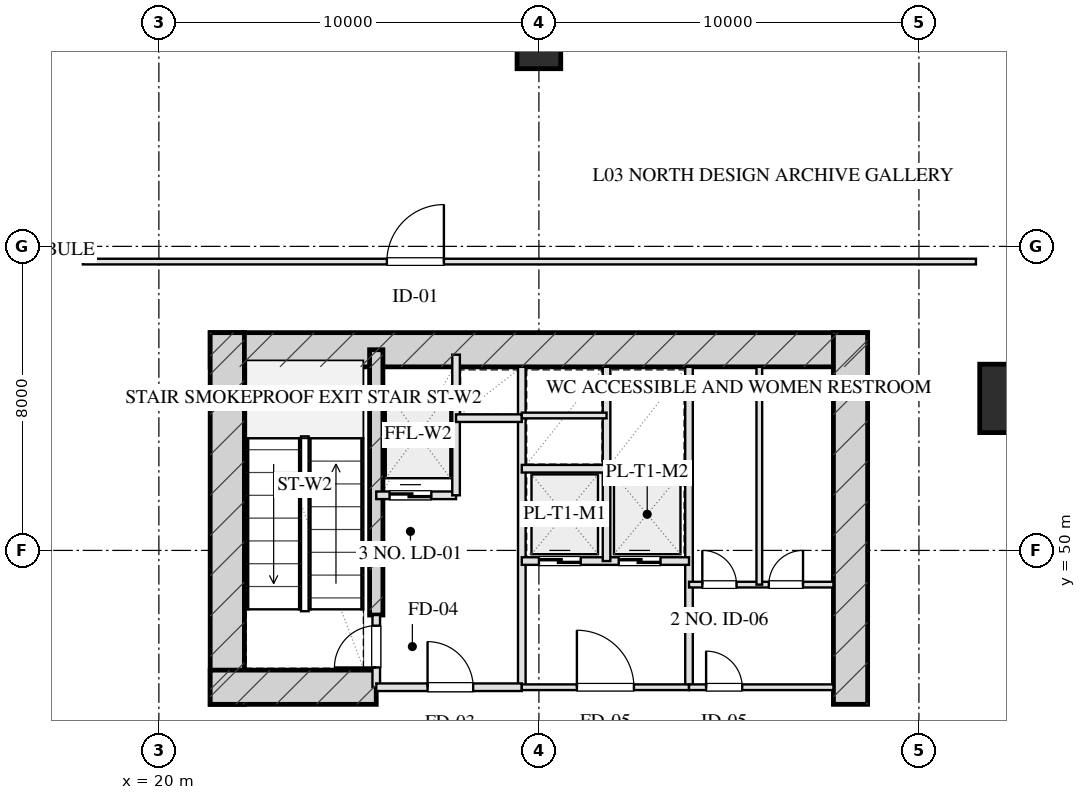
"""IFC4 building model, lengths in metres.
Left out: names, types, materials, properties, quantities, classifications, styles, units other than length and angle.
Written with IfcOpenShell. Run it as: python <this file> out.ifc"""

import sys

from ifc_helpers import new_model, si_unit, direction, frame, frame_2d, origin, origin_2d, place, context, subcontext, project, spatial, rectangle, hollow_rectangle, extrude, element, fill, save


model = new_model("IFC4")
c1 = context("Model", 3, precision=1e-05, world=origin(), true_north=direction((0.0, 1.0)))
c2 = subcontext(c1, "Body", "Model", "MODEL_VIEW")
j1 = project(units=[si_unit("LENGTHUNIT", "METRE"), si_unit("PLANEANGLEUNIT", "RADIAN")], contexts=[c1])
p1 = place(None, origin())
s1 = spatial("IfcSite", under=j1, at=p1, CompositionType="ELEMENT")
p2 = place(p1, origin())
s2 = spatial("IfcBuilding", under=s1, at=p2, CompositionType="ELEMENT")
p3 = place(p2, frame((0.0, 0.0, 16.5)))
s3 = spatial("IfcBuildingStorey", under=s2, at=p3, CompositionType="ELEMENT", Elevation=16.5)
p4 = place(p3, frame((21.35, 55.28, 0.0), z_axis=(0.0, 0.0, 1.0), x_axis=(1.0, 0.0, 0.0)))
e1 = element("IfcWall", 1, at=p4, inside=s3, PredefinedType="SHEAR", context=c2, shape_type="SweptSolid", body=[
    extrude(rectangle(XDim=17.3, YDim=0.9, at=frame_2d((8.65, 0.0))), origin(), (0.0, 0.0, 1.0), 5.5),
])
for number, where, z_axis, x_axis in (
    (2, (21.8, 45.95, 0.0), (0.0, 0.0, 1.0), (0.0, 1.0, 0.0)),
    (3, (38.2, 45.95, 0.0), (0.0, 0.0, 1.0), (0.0, 1.0, 0.0)),
):
    element("IfcWall", number, at=place(p3, frame(where, z_axis=z_axis, x_axis=x_axis)), inside=s3, PredefinedType="SHEAR", context=c2, shape_type="SweptSolid", body=[
        extrude(rectangle(XDim=9.78, YDim=0.9, at=frame_2d((4.89, 0.0))), origin(), (0.0, 0.0, 1.0), 5.5),
    ])
p5 = place(p3, frame((25.72, 48.3, 0.0), z_axis=(0.0, 0.0, 1.0), x_axis=(0.0, 1.0, 0.0)))
e4 = element("IfcWall", 4, at=p5, inside=s3, PredefinedType="SHEAR", context=c2, shape_type="SweptSolid", body=[
    extrude(rectangle(XDim=6.98, YDim=0.35, at=frame_2d((3.49, 0.0))), origin(), (0.0, 0.0, 1.0), 5.5),
])
p6 = place(p3, frame((21.35, 46.4, 0.0), z_axis=(0.0, 0.0, 1.0), x_axis=(1.0, 0.0, 0.0)))
e5 = element("IfcWall", 5, at=p6, inside=s3, PredefinedType="SHEAR", context=c2, shape_type="SweptSolid", body=[
    extrude(rectangle(XDim=4.37, YDim=0.9, at=frame_2d((2.185, 0.0))), origin(), (0.0, 0.0, 1.0), 5.5),
])
p7 = place(p3, frame((42.5, 54.0, 0.0), z_axis=(0.0, 0.0, 1.0), x_axis=(1.0, 0.0, 0.0)))
e6 = element("IfcColumn", 6, at=p7, inside=s3, PredefinedType="COLUMN", context=c2, shape_type="SweptSolid", body=[
    extrude(hollow_rectangle(XDim=1.8, YDim=1.8, WallThickness=0.06, at=origin_2d()), origin(), (0.0, 0.0, 1.0), 5.501),
])
p8 = place(p3, frame((30.0, 63.25, 0.0), z_axis=(0.0, 0.0, 1.0), x_axis=(1.0, 0.0, 0.0)))
e7 = element("IfcColumn", 7, at=p8, inside=s3, PredefinedType="COLUMN", context=c2, shape_type="SweptSolid", body=[
    extrude(hollow_rectangle(XDim=1.15, YDim=1.15, WallThickness=0.04, at=origin_2d()), origin(), (0.0, 0.0, 1.0), 5.501),
])
p9 = place(p3, frame((25.72, 46.4, 0.0), z_axis=(0.0, 0.0, 1.0), x_axis=(0.0, 1.0, 0.0)))
e8 = element("IfcWall", 8, at=p9, inside=s3, PredefinedType="PARTITIONING", context=c2, shape_type="SweptSolid", body=[
    extrude(rectangle(XDim=1.9, YDim=0.2, at=frame_2d((0.95, 0.0))), origin(), (0.0, 0.0, 1.0), 5.185),
])
p10 = place(p9, frame((0.52, 0.0, 0.0)))
e9 = element("IfcOpeningElement", 9, at=p10, cuts=e8, PredefinedType="OPENING", context=c2, shape_type="SweptSolid", body=[
    extrude(rectangle(XDim=1.1, YDim=2.05, at=frame_2d((0.55, 1.025))), frame((0.0, 0.11, 0.0), z_axis=(0.0, -1.0, 0.0), x_axis=(1.0, 0.0, 0.0)), (0.0, 0.0, 1.0), 0.22),
])
p11 = place(p3, frame((29.55, 46.4, 0.0), z_axis=(0.0, 0.0, 1.0), x_axis=(0.0, 1.0, 0.0)))
e10 = element("IfcWall", 10, at=p11, inside=s3, PredefinedType="PARTITIONING", context=c2, shape_type="SweptSolid", body=[
    extrude(rectangle(XDim=8.43, YDim=0.2, at=frame_2d((4.215, 0.0))), origin(), (0.0, 0.0, 1.0), 5.185),
])
p12 = place(p3, frame((25.72, 46.4, 0.0), z_axis=(0.0, 0.0, 1.0), x_axis=(1.0, 0.0, 0.0)))
e11 = element("IfcWall", 11, at=p12, inside=s3, PredefinedType="PARTITIONING", context=c2, shape_type="SweptSolid", body=[
    extrude(rectangle(XDim=3.83, YDim=0.2, at=frame_2d((1.915, 0.0))), origin(), (0.0, 0.0, 1.0), 5.185),
])
p13 = place(p12, frame((1.35, 0.0, 0.0)))
e12 = element("IfcOpeningElement", 12, at=p13, cuts=e11, PredefinedType="OPENING", context=c2, shape_type="SweptSolid", body=[
    extrude(rectangle(XDim=1.2, YDim=2.05, at=frame_2d((0.6, 1.025))), frame((0.0, 0.11, 0.0), z_axis=(0.0, -1.0, 0.0), x_axis=(1.0, 0.0, 0.0)), (0.0, 0.0, 1.0), 0.22),
])
p14 = place(p3, frame((25.72, 51.45, 0.0), z_axis=(0.0, 0.0, 1.0), x_axis=(1.0, 0.0, 0.0)))
e13 = element("IfcWall", 13, at=p14, inside=s3, PredefinedType="PARTITIONING", context=c2, shape_type="SweptSolid", body=[
    extrude(rectangle(XDim=2.1, YDim=0.2, at=frame_2d((1.05, 0.0))), origin(), (0.0, 0.0, 1.0), 5.185),
])
p15 = place(p14, frame((0.35, 0.0, 0.0)))
e14 = element("IfcOpeningElement", 14, at=p15, cuts=e13, PredefinedType="OPENING", context=c2, shape_type="SweptSolid", body=[
    extrude(rectangle(XDim=1.1, YDim=2.05, at=frame_2d((0.55, 1.025))), frame((0.0, 0.11, 0.0), z_axis=(0.0, -1.0, 0.0), x_axis=(1.0, 0.0, 0.0)), (0.0, 0.0, 1.0), 0.22),
])
p16 = place(p3, frame((27.82, 51.45, 0.0), z_axis=(0.0, 0.0, 1.0), x_axis=(0.0, 1.0, 0.0)))
e15 = element("IfcWall", 15, at=p16, inside=s3, PredefinedType="PARTITIONING", context=c2, shape_type="SweptSolid", body=[
    extrude(rectangle(XDim=3.7, YDim=0.2, at=frame_2d((1.85, 0.0))), origin(), (0.0, 0.0, 1.0), 5.185),
])
p17 = place(p3, frame((27.82, 53.48, 0.0), z_axis=(0.0, 0.0, 1.0), x_axis=(1.0, 0.0, 0.0)))
e16 = element("IfcWall", 16, at=p17, inside=s3, PredefinedType="PARTITIONING", context=c2, shape_type="SweptSolid", body=[
    extrude(rectangle(XDim=1.73, YDim=0.2, at=frame_2d((0.865, 0.0))), origin(), (0.0, 0.0, 1.0), 5.185),
])
p18 = place(p3, frame((33.95, 46.4, 0.0), z_axis=(0.0, 0.0, 1.0), x_axis=(0.0, 1.0, 0.0)))
e17 = element("IfcWall", 17, at=p18, inside=s3, PredefinedType="PARTITIONING", context=c2, shape_type="SweptSolid", body=[
    extrude(rectangle(XDim=8.43, YDim=0.2, at=frame_2d((4.215, 0.0))), origin(), (0.0, 0.0, 1.0), 5.185),
])
p19 = place(p3, frame((29.55, 46.4, 0.0), z_axis=(0.0, 0.0, 1.0), x_axis=(1.0, 0.0, 0.0)))
e18 = element("IfcWall", 18, at=p19, inside=s3, PredefinedType="PARTITIONING", context=c2, shape_type="SweptSolid", body=[
    extrude(rectangle(XDim=4.4, YDim=0.15, at=frame_2d((2.2, 0.0))), origin(), (0.0, 0.0, 1.0), 5.185),
])
p20 = place(p19, frame((1.45, 0.0, 0.0)))
e19 = element("IfcOpeningElement", 19, at=p20, cuts=e18, PredefinedType="OPENING", context=c2, shape_type="SweptSolid", body=[
    extrude(rectangle(XDim=1.5, YDim=2.05, at=frame_2d((0.75, 1.025))), frame((0.0, 0.085, 0.0), z_axis=(0.0, -1.0, 0.0), x_axis=(1.0, 0.0, 0.0)), (0.0, 0.0, 1.0), 0.17),
])
p21 = place(p3, frame((29.55, 49.72, 0.0), z_axis=(0.0, 0.0, 1.0), x_axis=(1.0, 0.0, 0.0)))
e20 = element("IfcWall", 20, at=p21, inside=s3, PredefinedType="PARTITIONING", context=c2, shape_type="SweptSolid", body=[
    extrude(rectangle(XDim=4.4, YDim=0.2, at=frame_2d((2.2, 0.0))), origin(), (0.0, 0.0, 1.0), 5.185),
])
p22 = place(p21, frame((0.45, 0.0, 0.0)))
e21 = element("IfcOpeningElement", 21, at=p22, cuts=e20, PredefinedType="OPENING", context=c2, shape_type="SweptSolid", body=[
    extrude(rectangle(XDim=1.1, YDim=2.05, at=frame_2d((0.55, 1.025))), frame((0.0, 0.11, 0.0), z_axis=(0.0, -1.0, 0.0), x_axis=(1.0, 0.0, 0.0)), (0.0, 0.0, 1.0), 0.22),
])
p23 = place(p21, frame((2.55, 0.0, 0.0)))
e22 = element("IfcOpeningElement", 22, at=p23, cuts=e20, PredefinedType="OPENING", context=c2, shape_type="SweptSolid", body=[
    extrude(rectangle(XDim=1.1, YDim=2.05, at=frame_2d((0.55, 1.025))), frame((0.0, 0.11, 0.0), z_axis=(0.0, -1.0, 0.0), x_axis=(1.0, 0.0, 0.0)), (0.0, 0.0, 1.0), 0.22),
])
p24 = place(p3, frame((31.78, 49.72, 0.0), z_axis=(0.0, 0.0, 1.0), x_axis=(0.0, 1.0, 0.0)))
e23 = element("IfcWall", 23, at=p24, inside=s3, PredefinedType="PARTITIONING", context=c2, shape_type="SweptSolid", body=[
    extrude(rectangle(XDim=5.11, YDim=0.2, at=frame_2d((2.555, 0.0))), origin(), (0.0, 0.0, 1.0), 5.185),
])
p25 = place(p3, frame((29.55, 52.15, 0.0), z_axis=(0.0, 0.0, 1.0), x_axis=(1.0, 0.0, 0.0)))
e24 = element("IfcWall", 24, at=p25, inside=s3, PredefinedType="PARTITIONING", context=c2, shape_type="SweptSolid", body=[
    extrude(rectangle(XDim=4.4, YDim=0.2, at=frame_2d((2.2, 0.0))), origin(), (0.0, 0.0, 1.0), 5.185),
])
p26 = place(p3, frame((29.55, 53.55, 0.0), z_axis=(0.0, 0.0, 1.0), x_axis=(1.0, 0.0, 0.0)))
e25 = element("IfcWall", 25, at=p26, inside=s3, PredefinedType="PARTITIONING", context=c2, shape_type="SweptSolid", body=[
    extrude(rectangle(XDim=2.23, YDim=0.15, at=frame_2d((1.115, 0.0))), origin(), (0.0, 0.0, 1.0), 5.185),
])
p27 = place(p3, frame((33.95, 46.4, 0.0), z_axis=(0.0, 0.0, 1.0), x_axis=(1.0, 0.0, 0.0)))
e26 = element("IfcWall", 26, at=p27, inside=s3, PredefinedType="PARTITIONING", context=c2, shape_type="SweptSolid", body=[
    extrude(rectangle(XDim=3.8, YDim=0.15, at=frame_2d((1.9, 0.0))), origin(), (0.0, 0.0, 1.0), 5.185),
])
p28 = place(p27, frame((0.45, 0.0, 0.0)))
e27 = element("IfcOpeningElement", 27, at=p28, cuts=e26, PredefinedType="OPENING", context=c2, shape_type="SweptSolid", body=[
    extrude(rectangle(XDim=0.95, YDim=2.05, at=frame_2d((0.475, 1.025))), frame((0.0, 0.085, 0.0), z_axis=(0.0, -1.0, 0.0), x_axis=(1.0, 0.0, 0.0)), (0.0, 0.0, 1.0), 0.17),
])
p29 = place(p3, frame((33.95, 49.1, 0.0), z_axis=(0.0, 0.0, 1.0), x_axis=(1.0, 0.0, 0.0)))
e28 = element("IfcWall", 28, at=p29, inside=s3, PredefinedType="PARTITIONING", context=c2, shape_type="SweptSolid", body=[
    extrude(rectangle(XDim=3.8, YDim=0.15, at=frame_2d((1.9, 0.0))), origin(), (0.0, 0.0, 1.0), 5.185),
])
p30 = place(p29, frame((0.35, 0.0, 0.0)))
e29 = element("IfcOpeningElement", 29, at=p30, cuts=e28, PredefinedType="OPENING", context=c2, shape_type="SweptSolid", body=[
    extrude(rectangle(XDim=0.9, YDim=2.05, at=frame_2d((0.45, 1.025))), frame((0.0, 0.085, 0.0), z_axis=(0.0, -1.0, 0.0), x_axis=(1.0, 0.0, 0.0)), (0.0, 0.0, 1.0), 0.17),
])
p31 = place(p29, frame((2.1, 0.0, 0.0)))
e30 = element("IfcOpeningElement", 30, at=p31, cuts=e28, PredefinedType="OPENING", context=c2, shape_type="SweptSolid", body=[
    extrude(rectangle(XDim=0.9, YDim=2.05, at=frame_2d((0.45, 1.025))), frame((0.0, 0.085, 0.0), z_axis=(0.0, -1.0, 0.0), x_axis=(1.0, 0.0, 0.0)), (0.0, 0.0, 1.0), 0.17),
])
p32 = place(p3, frame((35.8, 49.1, 0.0), z_axis=(0.0, 0.0, 1.0), x_axis=(0.0, 1.0, 0.0)))
e31 = element("IfcWall", 31, at=p32, inside=s3, PredefinedType="PARTITIONING", context=c2, shape_type="SweptSolid", body=[
    extrude(rectangle(XDim=5.73, YDim=0.15, at=frame_2d((2.865, 0.0))), origin(), (0.0, 0.0, 1.0), 5.185),
])
p33 = place(p3, frame((18.0, 57.6, 0.0), z_axis=(0.0, 0.0, 1.0), x_axis=(1.0, 0.0, 0.0)))
e32 = element("IfcWall", 32, at=p33, inside=s3, PredefinedType="PARTITIONING", context=c2, shape_type="SweptSolid", body=[
    extrude(rectangle(XDim=23.5, YDim=0.15, at=frame_2d((11.75, 0.0))), origin(), (0.0, 0.0, 1.0), 5.185),
])
p34 = place(p33, frame((8.0, 0.0, 0.0)))
e33 = element("IfcOpeningElement", 33, at=p34, cuts=e32, PredefinedType="OPENING", context=c2, shape_type="SweptSolid", body=[
    extrude(rectangle(XDim=1.5, YDim=2.05, at=frame_2d((0.75, 1.025))), frame((0.0, 0.085, 0.0), z_axis=(0.0, -1.0, 0.0), x_axis=(1.0, 0.0, 0.0)), (0.0, 0.0, 1.0), 0.17),
])
p35 = place(p10, origin())
e34 = element("IfcDoor", 34, at=p35, inside=s3, OperationType="SINGLE_SWING_LEFT", PredefinedType="DOOR", context=c2, shape_type="SweptSolid", body=[
    extrude(rectangle(XDim=1.1, YDim=2.05, at=frame_2d((0.55, 1.025))), frame((0.0, 0.025, 0.0), z_axis=(0.0, -1.0, 0.0), x_axis=(1.0, 0.0, 0.0)), (0.0, 0.0, 1.0), 0.05),
])
fill(e9, e34)
p36 = place(p13, origin())
e35 = element("IfcDoor", 35, at=p36, inside=s3, OperationType="SINGLE_SWING_LEFT", PredefinedType="DOOR", context=c2, shape_type="SweptSolid", body=[
    extrude(rectangle(XDim=1.2, YDim=2.05, at=frame_2d((0.6, 1.025))), frame((0.0, 0.025, 0.0), z_axis=(0.0, -1.0, 0.0), x_axis=(1.0, 0.0, 0.0)), (0.0, 0.0, 1.0), 0.05),
])
fill(e12, e35)
p37 = place(p15, origin())
e36 = element("IfcDoor", 36, at=p37, inside=s3, OperationType="DOUBLE_DOOR_SLIDING", PredefinedType="DOOR", context=c2, shape_type="SweptSolid", body=[
    extrude(rectangle(XDim=1.1, YDim=2.05, at=frame_2d((0.55, 1.025))), frame((0.0, 0.025, 0.0), z_axis=(0.0, -1.0, 0.0), x_axis=(1.0, 0.0, 0.0)), (0.0, 0.0, 1.0), 0.05),
])
fill(e14, e36)
p38 = place(p20, origin())
e37 = element("IfcDoor", 37, at=p38, inside=s3, OperationType="SINGLE_SWING_LEFT", PredefinedType="DOOR", context=c2, shape_type="SweptSolid", body=[
    extrude(rectangle(XDim=1.5, YDim=2.05, at=frame_2d((0.75, 1.025))), frame((0.0, 0.025, 0.0), z_axis=(0.0, -1.0, 0.0), x_axis=(1.0, 0.0, 0.0)), (0.0, 0.0, 1.0), 0.05),
])
fill(e19, e37)
p39 = place(p22, origin())
e38 = element("IfcDoor", 38, at=p39, inside=s3, OperationType="DOUBLE_DOOR_SLIDING", PredefinedType="DOOR", context=c2, shape_type="SweptSolid", body=[
    extrude(rectangle(XDim=1.1, YDim=2.05, at=frame_2d((0.55, 1.025))), frame((0.0, 0.025, 0.0), z_axis=(0.0, -1.0, 0.0), x_axis=(1.0, 0.0, 0.0)), (0.0, 0.0, 1.0), 0.05),
])
fill(e21, e38)
p40 = place(p23, origin())
e39 = element("IfcDoor", 39, at=p40, inside=s3, OperationType="DOUBLE_DOOR_SLIDING", PredefinedType="DOOR", context=c2, shape_type="SweptSolid", body=[
    extrude(rectangle(XDim=1.1, YDim=2.05, at=frame_2d((0.55, 1.025))), frame((0.0, 0.025, 0.0), z_axis=(0.0, -1.0, 0.0), x_axis=(1.0, 0.0, 0.0)), (0.0, 0.0, 1.0), 0.05),
])
fill(e22, e39)
p41 = place(p28, origin())
e40 = element("IfcDoor", 40, at=p41, inside=s3, OperationType="SINGLE_SWING_LEFT", PredefinedType="DOOR", context=c2, shape_type="SweptSolid", body=[
    extrude(rectangle(XDim=0.95, YDim=2.05, at=frame_2d((0.475, 1.025))), frame((0.0, 0.025, 0.0), z_axis=(0.0, -1.0, 0.0), x_axis=(1.0, 0.0, 0.0)), (0.0, 0.0, 1.0), 0.05),
])
fill(e27, e40)
p42 = place(p30, origin())
e41 = element("IfcDoor", 41, at=p42, inside=s3, OperationType="SINGLE_SWING_LEFT", PredefinedType="DOOR", context=c2, shape_type="SweptSolid", body=[
    extrude(rectangle(XDim=0.9, YDim=2.05, at=frame_2d((0.45, 1.025))), frame((0.0, 0.025, 0.0), z_axis=(0.0, -1.0, 0.0), x_axis=(1.0, 0.0, 0.0)), (0.0, 0.0, 1.0), 0.05),
])
fill(e29, e41)
p43 = place(p31, origin())
e42 = element("IfcDoor", 42, at=p43, inside=s3, OperationType="SINGLE_SWING_RIGHT", PredefinedType="DOOR", context=c2, shape_type="SweptSolid", body=[
    extrude(rectangle(XDim=0.9, YDim=2.05, at=frame_2d((0.45, 1.025))), frame((0.0, 0.025, 0.0), z_axis=(0.0, -1.0, 0.0), x_axis=(1.0, 0.0, 0.0)), (0.0, 0.0, 1.0), 0.05),
])
fill(e30, e42)
p44 = place(p34, origin())
e43 = element("IfcDoor", 43, at=p44, inside=s3, OperationType="SINGLE_SWING_RIGHT", PredefinedType="DOOR", context=c2, shape_type="SweptSolid", body=[
    extrude(rectangle(XDim=1.5, YDim=2.05, at=frame_2d((0.75, 1.025))), frame((0.0, 0.025, 0.0), z_axis=(0.0, -1.0, 0.0), x_axis=(1.0, 0.0, 0.0)), (0.0, 0.0, 1.0), 0.05),
])
fill(e33, e43)
save(model, sys.argv[1])
